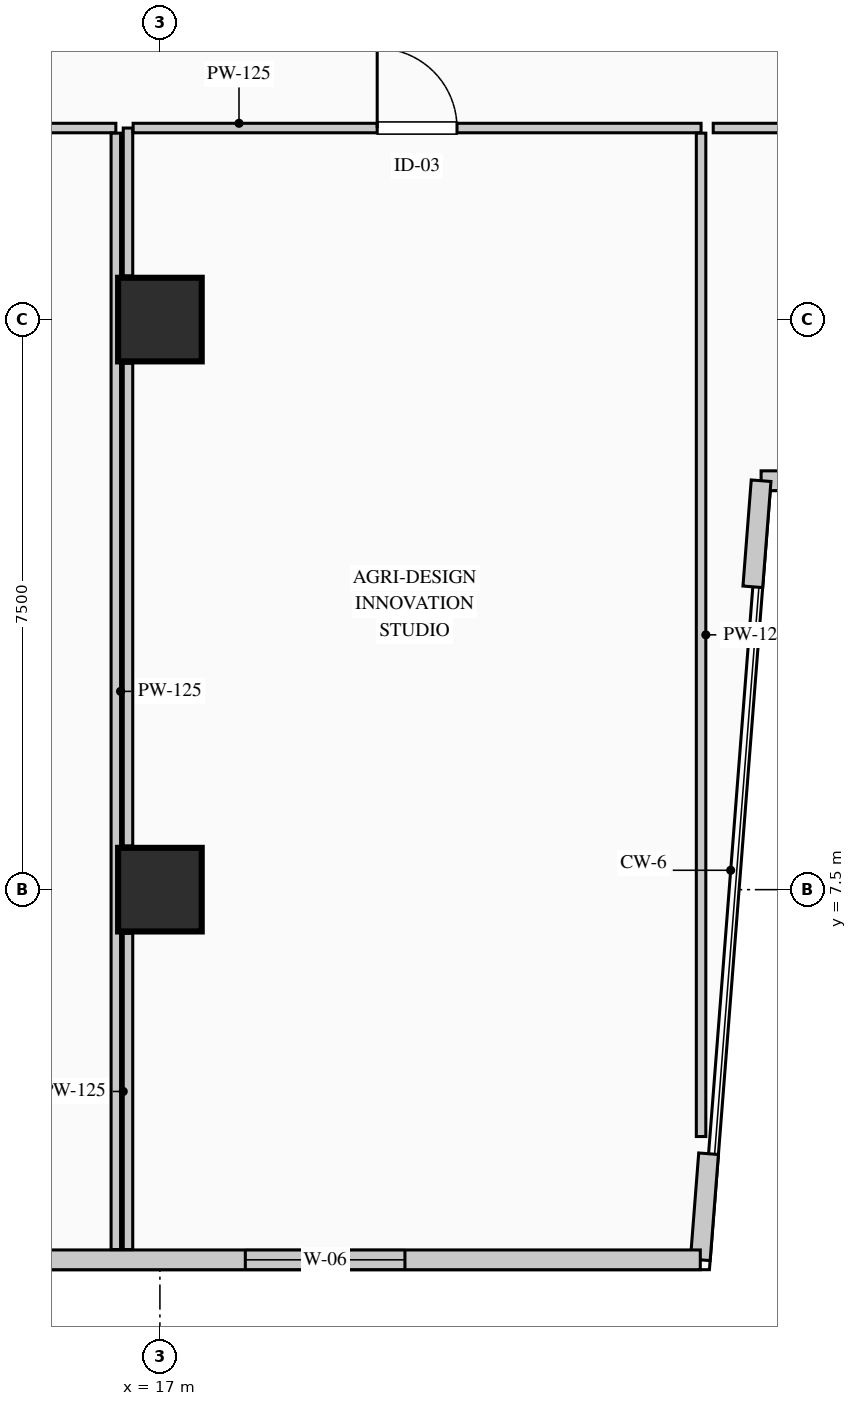
"""IFC4 building model, lengths in metres.
Left out: names, types, materials, properties, quantities, classifications, styles, units other than length and angle.
Written with IfcOpenShell. Run it as: python <this file> out.ifc"""

import sys

from ifc_helpers import new_model, si_unit, direction, frame, frame_2d, origin, origin_2d, place, context, subcontext, project, spatial, rectangle, extrude, element, fill, save


model = new_model("IFC4")
c1 = context("Model", 3, precision=1e-05, world=origin(), true_north=direction((0.0, 1.0)))
c2 = subcontext(c1, "Body", "Model", "MODEL_VIEW")
j1 = project(units=[si_unit("LENGTHUNIT", "METRE"), si_unit("PLANEANGLEUNIT", "RADIAN")], contexts=[c1])
p1 = place(None, origin())
s1 = spatial("IfcSite", under=j1, at=p1, CompositionType="ELEMENT")
p2 = place(p1, origin())
s2 = spatial("IfcBuilding", under=s1, at=p2, CompositionType="ELEMENT")
p3 = place(p2, frame((0.0, 0.0, 170.65)))
s3 = spatial("IfcBuildingStorey", under=s2, at=p3, CompositionType="ELEMENT", Elevation=170.65)
for number, where, z_axis, x_axis in (
    (1, (17.0, 7.5, 0.0), (0.0, 0.0, 1.0), (1.0, 0.0, 0.0)),
    (2, (17.0, 15.0, 0.0), (0.0, 0.0, 1.0), (1.0, 0.0, 0.0)),
):
    element("IfcColumn", number, at=place(p3, frame(where, z_axis=z_axis, x_axis=x_axis)), inside=s3, PredefinedType="COLUMN", context=c2, shape_type="SweptSolid", body=[
        extrude(rectangle(XDim=1.1, YDim=1.1, at=origin_2d()), origin(), (0.0, 0.0, 1.0), 3.95),
    ])
p4 = place(p3, frame((32.675, 12.88, 0.0), z_axis=(0.0, 0.0, 1.0), x_axis=(-1.0, 0.0, 0.0)))
e3 = element("IfcWall", 3, at=p4, inside=s3, PredefinedType="STANDARD", context=c2, shape_type="SweptSolid", body=[
    extrude(rectangle(XDim=7.765, YDim=0.26, at=frame_2d((3.883, 0.0))), origin(), (0.0, 0.0, 1.0), 3.69),
])
p5 = place(p4, frame((2.983, 0.0, 0.9)))
e4 = element("IfcOpeningElement", 4, at=p5, cuts=e3, PredefinedType="OPENING", context=c2, shape_type="SweptSolid", body=[
    extrude(rectangle(XDim=1.8, YDim=2.1, at=frame_2d((0.9, 1.05))), frame((0.0, 0.14, 0.0), z_axis=(0.0, -1.0, 0.0), x_axis=(1.0, 0.0, 0.0)), (0.0, 0.0, 1.0), 0.28),
])
for number, where, z_axis, x_axis in (
    (5, (24.91, 12.88, 0.0), (0.0, 0.0, 1.0), (-0.078, -0.997, 0.0)),
    (6, (24.219, 4.026, 0.0), (0.0, 0.0, 1.0), (-0.078, -0.997, 0.0)),
):
    element("IfcWall", number, at=place(p3, frame(where, z_axis=z_axis, x_axis=x_axis)), inside=s3, PredefinedType="STANDARD", context=c2, shape_type="SweptSolid", body=[
        extrude(rectangle(XDim=1.4, YDim=0.26, at=frame_2d((0.7, 0.0))), origin(), (0.0, 0.0, 1.0), 3.69),
    ])
p6 = place(p3, frame((24.11, 2.63, 0.0), z_axis=(0.0, 0.0, 1.0), x_axis=(-1.0, 0.0, 0.0)))
e7 = element("IfcWall", 7, at=p6, inside=s3, PredefinedType="STANDARD", context=c2, shape_type="SweptSolid", body=[
    extrude(rectangle(XDim=13.71, YDim=0.26, at=frame_2d((6.855, 0.0))), origin(), (0.0, 0.0, 1.0), 3.69),
])
p7 = place(p6, frame((3.886, 0.0, 0.9)))
e8 = element("IfcOpeningElement", 8, at=p7, cuts=e7, PredefinedType="OPENING", context=c2, shape_type="SweptSolid", body=[
    extrude(rectangle(XDim=2.1, YDim=2.0, at=frame_2d((1.05, 1.0))), frame((0.0, 0.14, 0.0), z_axis=(0.0, -1.0, 0.0), x_axis=(1.0, 0.0, 0.0)), (0.0, 0.0, 1.0), 0.28),
])
p8 = place(p3, frame((16.58, 2.765, 0.0), z_axis=(0.0, 0.0, 1.0), x_axis=(0.0, 1.0, 0.0)))
e9 = element("IfcWall", 9, at=p8, inside=s3, PredefinedType="PARTITIONING", context=c2, shape_type="SweptSolid", body=[
    extrude(rectangle(XDim=4.16, YDim=0.125, at=frame_2d((2.08, 0.0))), origin(), (0.0, 0.0, 1.0), 3.69),
])
p9 = place(p3, frame((16.58, 8.075, 0.0), z_axis=(0.0, 0.0, 1.0), x_axis=(0.0, 1.0, 0.0)))
e10 = element("IfcWall", 10, at=p9, inside=s3, PredefinedType="PARTITIONING", context=c2, shape_type="SweptSolid", body=[
    extrude(rectangle(XDim=6.35, YDim=0.125, at=frame_2d((3.175, 0.0))), origin(), (0.0, 0.0, 1.0), 3.69),
])
p10 = place(p3, frame((16.58, 15.575, 0.0), z_axis=(0.0, 0.0, 1.0), x_axis=(0.0, 1.0, 0.0)))
e11 = element("IfcWall", 11, at=p10, inside=s3, PredefinedType="PARTITIONING", context=c2, shape_type="SweptSolid", body=[
    extrude(rectangle(XDim=1.945, YDim=0.125, at=frame_2d((0.973, 0.0))), origin(), (0.0, 0.0, 1.0), 3.69),
])
p11 = place(p3, frame((16.647, 17.52, 0.0), z_axis=(0.0, 0.0, 1.0), x_axis=(1.0, 0.0, 0.0)))
e12 = element("IfcWall", 12, at=p11, inside=s3, PredefinedType="PARTITIONING", context=c2, shape_type="SweptSolid", body=[
    extrude(rectangle(XDim=7.473, YDim=0.125, at=frame_2d((3.736, 0.0))), origin(), (0.0, 0.0, 1.0), 3.69),
])
p12 = place(p11, frame((3.211, 0.0, 0.0)))
e13 = element("IfcOpeningElement", 13, at=p12, cuts=e12, PredefinedType="OPENING", context=c2, shape_type="SweptSolid", body=[
    extrude(rectangle(XDim=1.05, YDim=2.15, at=frame_2d((0.525, 1.075))), frame((0.0, 0.073, 0.0), z_axis=(0.0, -1.0, 0.0), x_axis=(1.0, 0.0, 0.0)), (0.0, 0.0, 1.0), 0.145),
])
p13 = place(p3, frame((24.12, 17.452, 0.0), z_axis=(0.0, 0.0, 1.0), x_axis=(0.0, -1.0, 0.0)))
e14 = element("IfcWall", 14, at=p13, inside=s3, PredefinedType="PARTITIONING", context=c2, shape_type="SweptSolid", body=[
    extrude(rectangle(XDim=13.2, YDim=0.125, at=frame_2d((6.6, 0.0))), origin(), (0.0, 0.0, 1.0), 3.69),
])
p14 = place(p3, frame((9.948, 17.52, 0.0), z_axis=(0.0, 0.0, 1.0), x_axis=(1.0, 0.0, 0.0)))
e15 = element("IfcWall", 15, at=p14, inside=s3, PredefinedType="PARTITIONING", context=c2, shape_type="SweptSolid", body=[
    extrude(rectangle(XDim=6.472, YDim=0.125, at=frame_2d((3.236, 0.0))), origin(), (0.0, 0.0, 1.0), 3.69),
])
p15 = place(p14, frame((2.711, 0.0, 0.0)))
e16 = element("IfcOpeningElement", 16, at=p15, cuts=e15, PredefinedType="OPENING", context=c2, shape_type="SweptSolid", body=[
    extrude(rectangle(XDim=1.05, YDim=2.15, at=frame_2d((0.525, 1.075))), frame((0.0, 0.073, 0.0), z_axis=(0.0, -1.0, 0.0), x_axis=(1.0, 0.0, 0.0)), (0.0, 0.0, 1.0), 0.145),
])
p16 = place(p3, frame((16.42, 17.452, 0.0), z_axis=(0.0, 0.0, 1.0), x_axis=(0.0, -1.0, 0.0)))
e17 = element("IfcWall", 17, at=p16, inside=s3, PredefinedType="PARTITIONING", context=c2, shape_type="SweptSolid", body=[
    extrude(rectangle(XDim=14.688, YDim=0.125, at=frame_2d((7.344, 0.0))), origin(), (0.0, 0.0, 1.0), 3.69),
])
p17 = place(p3, frame((24.28, 17.52, 0.0), z_axis=(0.0, 0.0, 1.0), x_axis=(1.0, 0.0, 0.0)))
e18 = element("IfcWall", 18, at=p17, inside=s3, PredefinedType="PARTITIONING", context=c2, shape_type="SweptSolid", body=[
    extrude(rectangle(XDim=8.14, YDim=0.125, at=frame_2d((4.07, 0.0))), origin(), (0.0, 0.0, 1.0), 3.275),
])
p18 = place(p17, frame((3.545, 0.0, 0.0)))
e19 = element("IfcOpeningElement", 19, at=p18, cuts=e18, PredefinedType="OPENING", context=c2, shape_type="SweptSolid", body=[
    extrude(rectangle(XDim=1.05, YDim=2.15, at=frame_2d((0.525, 1.075))), frame((0.0, 0.073, 0.0), z_axis=(0.0, -1.0, 0.0), x_axis=(1.0, 0.0, 0.0)), (0.0, 0.0, 1.0), 0.145),
])
p19 = place(p7, origin())
e20 = element("IfcWindow", 20, at=p19, inside=s3, PartitioningType="DOUBLE_PANEL_VERTICAL", PredefinedType="WINDOW", context=c2, shape_type="SweptSolid", body=[
    extrude(rectangle(XDim=2.1, YDim=2.0, at=frame_2d((1.05, 1.0))), frame((0.0, 0.03, 0.0), z_axis=(0.0, -1.0, 0.0), x_axis=(1.0, 0.0, 0.0)), (0.0, 0.0, 1.0), 0.06),
])
fill(e8, e20)
p20 = place(p12, origin())
e21 = element("IfcDoor", 21, at=p20, inside=s3, OperationType="SINGLE_SWING_LEFT", PredefinedType="DOOR", context=c2, shape_type="SweptSolid", body=[
    extrude(rectangle(XDim=1.05, YDim=2.15, at=frame_2d((0.525, 1.075))), frame((0.0, 0.025, 0.0), z_axis=(0.0, -1.0, 0.0), x_axis=(1.0, 0.0, 0.0)), (0.0, 0.0, 1.0), 0.05),
])
fill(e13, e21)
save(model, sys.argv[1])
